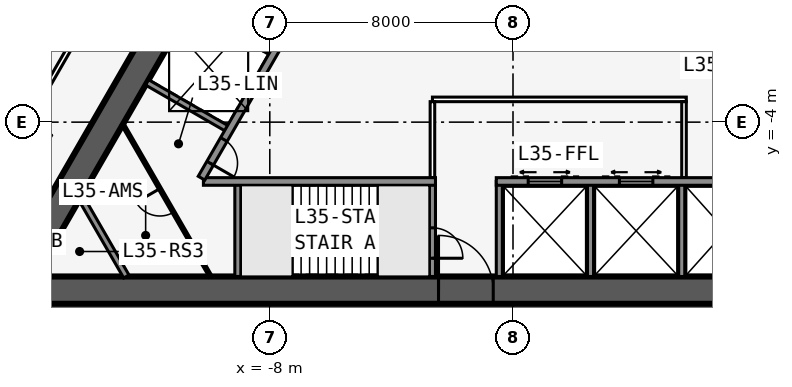
"""IFC4 building model, lengths in metres.
Left out: names, types, materials, properties, quantities, classifications, styles, units other than length and angle.
Written with IfcOpenShell. Run it as: python <this file> out.ifc"""

import sys

from ifc_helpers import new_model, si_unit, direction, frame, frame_2d, origin, place, context, subcontext, project, spatial, rectangle, extrude, element, fill, save


model = new_model("IFC4")
c1 = context("Model", 3, precision=1e-05, world=origin(), true_north=direction((0.0, 1.0)))
c2 = subcontext(c1, "Body", "Model", "MODEL_VIEW")
j1 = project(units=[si_unit("LENGTHUNIT", "METRE"), si_unit("PLANEANGLEUNIT", "RADIAN")], contexts=[c1])
p1 = place(None, origin())
s1 = spatial("IfcSite", under=j1, at=p1, CompositionType="ELEMENT")
p2 = place(p1, origin())
s2 = spatial("IfcBuilding", under=s1, at=p2, CompositionType="ELEMENT")
p3 = place(p2, frame((0.0, 0.0, 135.1)))
s3 = spatial("IfcBuildingStorey", under=s2, at=p3, CompositionType="ELEMENT", Elevation=135.1)
p4 = place(p3, frame((-16.5, -9.526, 0.0), z_axis=(0.0, 0.0, 1.0), x_axis=(1.0, 0.0, 0.0)))
e1 = element("IfcWall", 1, at=p4, inside=s3, PredefinedType="SHEAR", context=c2, shape_type="SweptSolid", body=[
    extrude(rectangle(XDim=33.0, YDim=0.9, at=frame_2d((16.5, 0.0))), origin(), (0.0, 0.0, 1.0), 3.4),
])
p5 = place(p4, frame((14.05, 0.0, 0.0)))
e2 = element("IfcOpeningElement", 2, at=p5, cuts=e1, PredefinedType="OPENING", context=c2, shape_type="SweptSolid", body=[
    extrude(rectangle(XDim=1.8, YDim=2.13, at=frame_2d((0.9, 1.065))), frame((0.0, 0.46, 0.0), z_axis=(0.0, -1.0, 0.0), x_axis=(1.0, 0.0, 0.0)), (0.0, 0.0, 1.0), 0.92),
])
p6 = place(p3, frame((-10.183, -5.951, 0.0), z_axis=(0.0, 0.0, 1.0), x_axis=(1.0, 0.0, 0.0)))
e3 = element("IfcWall", 3, at=p6, inside=s3, PredefinedType="SOLIDWALL", context=c2, shape_type="SweptSolid", body=[
    extrude(rectangle(XDim=7.633, YDim=0.25, at=frame_2d((3.816, 0.0))), origin(), (0.0, 0.0, 1.0), 3.235),
])
p7 = place(p3, frame((-0.55, -5.951, 0.0), z_axis=(0.0, 0.0, 1.0), x_axis=(1.0, 0.0, 0.0)))
e4 = element("IfcWall", 4, at=p7, inside=s3, PredefinedType="SOLIDWALL", context=c2, shape_type="SweptSolid", body=[
    extrude(rectangle(XDim=10.733, YDim=0.25, at=frame_2d((5.366, 0.0))), origin(), (0.0, 0.0, 1.0), 3.235),
])
p8 = place(p7, frame((9.314, 0.0, 0.0)))
e5 = element("IfcOpeningElement", 5, at=p8, cuts=e4, PredefinedType="OPENING", context=c2, shape_type="SweptSolid", body=[
    extrude(rectangle(XDim=0.9, YDim=2.13, at=frame_2d((0.45, 1.065))), frame((0.0, 0.135, 0.0), z_axis=(0.0, -1.0, 0.0), x_axis=(1.0, 0.0, 0.0)), (0.0, 0.0, 1.0), 0.27),
])
p9 = place(p7, frame((1.05, 0.0, 0.0)))
e6 = element("IfcOpeningElement", 6, at=p9, cuts=e4, PredefinedType="OPENING", context=c2, shape_type="SweptSolid", body=[
    extrude(rectangle(XDim=1.1, YDim=2.13, at=frame_2d((0.55, 1.065))), frame((0.0, 0.135, 0.0), z_axis=(0.0, -1.0, 0.0), x_axis=(1.0, 0.0, 0.0)), (0.0, 0.0, 1.0), 0.27),
])
p10 = place(p7, frame((4.05, 0.0, 0.0)))
e7 = element("IfcOpeningElement", 7, at=p10, cuts=e4, PredefinedType="OPENING", context=c2, shape_type="SweptSolid", body=[
    extrude(rectangle(XDim=1.1, YDim=2.13, at=frame_2d((0.55, 1.065))), frame((0.0, 0.135, 0.0), z_axis=(0.0, -1.0, 0.0), x_axis=(1.0, 0.0, 0.0)), (0.0, 0.0, 1.0), 0.27),
])
p11 = place(p3, frame((-9.05, -5.951, 0.0), z_axis=(0.0, 0.0, 1.0), x_axis=(0.0, -1.0, 0.0)))
e8 = element("IfcWall", 8, at=p11, inside=s3, PredefinedType="SOLIDWALL", context=c2, shape_type="SweptSolid", body=[
    extrude(rectangle(XDim=3.125, YDim=0.2, at=frame_2d((1.562, 0.0))), origin(), (0.0, 0.0, 1.0), 3.235),
])
p12 = place(p3, frame((-2.65, -5.951, 0.0), z_axis=(0.0, 0.0, 1.0), x_axis=(0.0, -1.0, 0.0)))
e9 = element("IfcWall", 9, at=p12, inside=s3, PredefinedType="SOLIDWALL", context=c2, shape_type="SweptSolid", body=[
    extrude(rectangle(XDim=3.125, YDim=0.2, at=frame_2d((1.562, 0.0))), origin(), (0.0, 0.0, 1.0), 3.235),
])
p13 = place(p12, frame((1.525, 0.0, 0.0)))
e10 = element("IfcOpeningElement", 10, at=p13, cuts=e9, PredefinedType="OPENING", context=c2, shape_type="SweptSolid", body=[
    extrude(rectangle(XDim=1.0, YDim=2.13, at=frame_2d((0.5, 1.065))), frame((0.0, 0.11, 0.0), z_axis=(0.0, -1.0, 0.0), x_axis=(1.0, 0.0, 0.0)), (0.0, 0.0, 1.0), 0.22),
])
for number, where, z_axis, x_axis in (
    (11, (-0.45, -5.951, 0.0), (0.0, 0.0, 1.0), (0.0, -1.0, 0.0)),
    (12, (2.55, -5.951, 0.0), (0.0, 0.0, 1.0), (0.0, -1.0, 0.0)),
    (13, (5.55, -5.951, 0.0), (0.0, 0.0, 1.0), (0.0, -1.0, 0.0)),
):
    element("IfcWall", number, at=place(p3, frame(where, z_axis=z_axis, x_axis=x_axis)), inside=s3, PredefinedType="SOLIDWALL", context=c2, shape_type="SweptSolid", body=[
        extrude(rectangle(XDim=3.125, YDim=0.2, at=frame_2d((1.562, 0.0))), origin(), (0.0, 0.0, 1.0), 3.235),
    ])
p14 = place(p3, frame((16.5, -9.526, 0.0), z_axis=(0.0, 0.0, 1.0), x_axis=(-0.499999749417, 0.866025548458, 0.0)))
e14 = element("IfcWall", 14, at=p14, inside=s3, PredefinedType="SHEAR", context=c2, shape_type="SweptSolid", body=[
    extrude(rectangle(XDim=33.0, YDim=0.9, at=frame_2d((16.5, 0.0))), origin(), (0.0, 0.0, 1.0), 3.4),
])
p15 = place(p14, frame((14.15, 0.0, 0.0)))
e15 = element("IfcOpeningElement", 15, at=p15, cuts=e14, PredefinedType="OPENING", context=c2, shape_type="SweptSolid", body=[
    extrude(rectangle(XDim=1.8, YDim=2.13, at=frame_2d((0.9, 1.065))), frame((0.0, 0.46, 0.0), z_axis=(0.0, -1.0, 0.0), x_axis=(1.0, 0.0, 0.0)), (0.0, 0.0, 1.0), 0.92),
])
p16 = place(p14, frame((12.6, 0.0, 0.0)))
e16 = element("IfcOpeningElement", 16, at=p16, cuts=e14, PredefinedType="OPENING", context=c2, shape_type="SweptSolid", body=[
    extrude(rectangle(XDim=1.0, YDim=2.13, at=frame_2d((0.5, 1.065))), frame((0.0, 0.46, 0.0), z_axis=(0.0, -1.0, 0.0), x_axis=(1.0, 0.0, 0.0)), (0.0, 0.0, 1.0), 0.92),
])
p17 = place(p3, frame((10.245, -5.843, 0.0), z_axis=(0.0, 0.0, 1.0), x_axis=(-0.499993009313, 0.866029439822, 0.0)))
e17 = element("IfcWall", 17, at=p17, inside=s3, PredefinedType="SOLIDWALL", context=c2, shape_type="SweptSolid", body=[
    extrude(rectangle(XDim=7.733, YDim=0.25, at=frame_2d((3.866, 0.0))), origin(), (0.0, 0.0, 1.0), 3.235),
])
p18 = place(p3, frame((0.0, 19.052, 0.0), z_axis=(0.0, 0.0, 1.0), x_axis=(-0.499999749417, -0.866025548458, 0.0)))
e18 = element("IfcWall", 18, at=p18, inside=s3, PredefinedType="SHEAR", context=c2, shape_type="SweptSolid", body=[
    extrude(rectangle(XDim=33.0, YDim=0.9, at=frame_2d((16.5, 0.0))), origin(), (0.0, 0.0, 1.0), 3.4),
])
p19 = place(p18, frame((14.15, 0.0, 0.0)))
e19 = element("IfcOpeningElement", 19, at=p19, cuts=e18, PredefinedType="OPENING", context=c2, shape_type="SweptSolid", body=[
    extrude(rectangle(XDim=1.8, YDim=2.13, at=frame_2d((0.9, 1.065))), frame((0.0, 0.46, 0.0), z_axis=(0.0, -1.0, 0.0), x_axis=(1.0, 0.0, 0.0)), (0.0, 0.0, 1.0), 0.92),
])
p20 = place(p18, frame((12.6, 0.0, 0.0)))
e20 = element("IfcOpeningElement", 20, at=p20, cuts=e18, PredefinedType="OPENING", context=c2, shape_type="SweptSolid", body=[
    extrude(rectangle(XDim=1.0, YDim=2.13, at=frame_2d((0.5, 1.065))), frame((0.0, 0.46, 0.0), z_axis=(0.0, -1.0, 0.0), x_axis=(1.0, 0.0, 0.0)), (0.0, 0.0, 1.0), 0.92),
])
p21 = place(p3, frame((-4.929, 3.365, 0.0), z_axis=(0.0, 0.0, 1.0), x_axis=(-0.499991433582, -0.866030349552, 0.0)))
e21 = element("IfcWall", 21, at=p21, inside=s3, PredefinedType="SOLIDWALL", context=c2, shape_type="SweptSolid", body=[
    extrude(rectangle(XDim=10.633, YDim=0.25, at=frame_2d((5.316, 0.0))), origin(), (0.0, 0.0, 1.0), 3.235),
])
p22 = place(p21, frame((9.164, 0.0, 0.0)))
e22 = element("IfcOpeningElement", 22, at=p22, cuts=e21, PredefinedType="OPENING", context=c2, shape_type="SweptSolid", body=[
    extrude(rectangle(XDim=0.9, YDim=2.13, at=frame_2d((0.45, 1.065))), frame((0.0, 0.135, 0.0), z_axis=(0.0, -1.0, 0.0), x_axis=(1.0, 0.0, 0.0)), (0.0, 0.0, 1.0), 0.27),
])
for number, where, z_axis, x_axis in (
    (23, (-7.879, -1.744, 0.0), (0.0, 0.0, 1.0), (-0.866, 0.5, 0.0)),
    (24, (-9.329, -4.256, 0.0), (0.0, 0.0, 1.0), (-0.866, 0.5, 0.0)),
):
    element("IfcWall", number, at=place(p3, frame(where, z_axis=z_axis, x_axis=x_axis)), inside=s3, PredefinedType="SOLIDWALL", context=c2, shape_type="SweptSolid", body=[
        extrude(rectangle(XDim=3.125, YDim=0.2, at=frame_2d((1.562, 0.0))), origin(), (0.0, 0.0, 1.0), 3.235),
    ])
p23 = place(p3, frame((20.027, -10.985, 0.0), z_axis=(0.0, 0.0, 1.0), x_axis=(-0.500001677587, 0.866024435227, 0.0)))
e25 = element("IfcWall", 25, at=p23, inside=s3, PredefinedType="PARTITIONING", context=c2, shape_type="SweptSolid", body=[
    extrude(rectangle(XDim=39.054, YDim=0.15, at=frame_2d((19.527, 0.0))), origin(), (0.0, 0.0, 1.0), 3.235),
])
p24 = place(p23, frame((1.558, 0.0, 0.0)))
e26 = element("IfcOpeningElement", 26, at=p24, cuts=e25, PredefinedType="OPENING", context=c2, shape_type="SweptSolid", body=[
    extrude(rectangle(XDim=0.95, YDim=2.13, at=frame_2d((0.475, 1.065))), frame((0.0, 0.085, 0.0), z_axis=(0.0, -1.0, 0.0), x_axis=(1.0, 0.0, 0.0)), (0.0, 0.0, 1.0), 0.17),
])
p25 = place(p23, frame((10.352, 0.0, 0.0)))
e27 = element("IfcOpeningElement", 27, at=p25, cuts=e25, PredefinedType="OPENING", context=c2, shape_type="SweptSolid", body=[
    extrude(rectangle(XDim=0.95, YDim=2.13, at=frame_2d((0.475, 1.065))), frame((0.0, 0.085, 0.0), z_axis=(0.0, -1.0, 0.0), x_axis=(1.0, 0.0, 0.0)), (0.0, 0.0, 1.0), 0.17),
])
p26 = place(p23, frame((17.152, 0.0, 0.0)))
e28 = element("IfcOpeningElement", 28, at=p26, cuts=e25, PredefinedType="OPENING", context=c2, shape_type="SweptSolid", body=[
    extrude(rectangle(XDim=0.95, YDim=2.13, at=frame_2d((0.475, 1.065))), frame((0.0, 0.085, 0.0), z_axis=(0.0, -1.0, 0.0), x_axis=(1.0, 0.0, 0.0)), (0.0, 0.0, 1.0), 0.17),
])
p27 = place(p23, frame((20.952, 0.0, 0.0)))
e29 = element("IfcOpeningElement", 29, at=p27, cuts=e25, PredefinedType="OPENING", context=c2, shape_type="SweptSolid", body=[
    extrude(rectangle(XDim=0.95, YDim=2.13, at=frame_2d((0.475, 1.065))), frame((0.0, 0.085, 0.0), z_axis=(0.0, -1.0, 0.0), x_axis=(1.0, 0.0, 0.0)), (0.0, 0.0, 1.0), 0.17),
])
p28 = place(p23, frame((27.152, 0.0, 0.0)))
e30 = element("IfcOpeningElement", 30, at=p28, cuts=e25, PredefinedType="OPENING", context=c2, shape_type="SweptSolid", body=[
    extrude(rectangle(XDim=0.95, YDim=2.13, at=frame_2d((0.475, 1.065))), frame((0.0, 0.085, 0.0), z_axis=(0.0, -1.0, 0.0), x_axis=(1.0, 0.0, 0.0)), (0.0, 0.0, 1.0), 0.17),
])
p29 = place(p23, frame((36.546, 0.0, 0.0)))
e31 = element("IfcOpeningElement", 31, at=p29, cuts=e25, PredefinedType="OPENING", context=c2, shape_type="SweptSolid", body=[
    extrude(rectangle(XDim=0.95, YDim=2.13, at=frame_2d((0.475, 1.065))), frame((0.0, 0.085, 0.0), z_axis=(0.0, -1.0, 0.0), x_axis=(1.0, 0.0, 0.0)), (0.0, 0.0, 1.0), 0.17),
])
p30 = place(p3, frame((-0.5, 22.836, 0.0), z_axis=(0.0, 0.0, 1.0), x_axis=(-0.500001677587, -0.866024435227, 0.0)))
e32 = element("IfcWall", 32, at=p30, inside=s3, PredefinedType="PARTITIONING", context=c2, shape_type="SweptSolid", body=[
    extrude(rectangle(XDim=39.054, YDim=0.15, at=frame_2d((19.527, 0.0))), origin(), (0.0, 0.0, 1.0), 3.235),
])
p31 = place(p30, frame((1.558, 0.0, 0.0)))
e33 = element("IfcOpeningElement", 33, at=p31, cuts=e32, PredefinedType="OPENING", context=c2, shape_type="SweptSolid", body=[
    extrude(rectangle(XDim=0.95, YDim=2.13, at=frame_2d((0.475, 1.065))), frame((0.0, 0.085, 0.0), z_axis=(0.0, -1.0, 0.0), x_axis=(1.0, 0.0, 0.0)), (0.0, 0.0, 1.0), 0.17),
])
p32 = place(p30, frame((10.952, 0.0, 0.0)))
e34 = element("IfcOpeningElement", 34, at=p32, cuts=e32, PredefinedType="OPENING", context=c2, shape_type="SweptSolid", body=[
    extrude(rectangle(XDim=0.95, YDim=2.13, at=frame_2d((0.475, 1.065))), frame((0.0, 0.085, 0.0), z_axis=(0.0, -1.0, 0.0), x_axis=(1.0, 0.0, 0.0)), (0.0, 0.0, 1.0), 0.17),
])
p33 = place(p30, frame((17.752, 0.0, 0.0)))
e35 = element("IfcOpeningElement", 35, at=p33, cuts=e32, PredefinedType="OPENING", context=c2, shape_type="SweptSolid", body=[
    extrude(rectangle(XDim=0.95, YDim=2.13, at=frame_2d((0.475, 1.065))), frame((0.0, 0.085, 0.0), z_axis=(0.0, -1.0, 0.0), x_axis=(1.0, 0.0, 0.0)), (0.0, 0.0, 1.0), 0.17),
])
p34 = place(p30, frame((21.552, 0.0, 0.0)))
e36 = element("IfcOpeningElement", 36, at=p34, cuts=e32, PredefinedType="OPENING", context=c2, shape_type="SweptSolid", body=[
    extrude(rectangle(XDim=0.95, YDim=2.13, at=frame_2d((0.475, 1.065))), frame((0.0, 0.085, 0.0), z_axis=(0.0, -1.0, 0.0), x_axis=(1.0, 0.0, 0.0)), (0.0, 0.0, 1.0), 0.17),
])
p35 = place(p30, frame((30.952, 0.0, 0.0)))
e37 = element("IfcOpeningElement", 37, at=p35, cuts=e32, PredefinedType="OPENING", context=c2, shape_type="SweptSolid", body=[
    extrude(rectangle(XDim=0.95, YDim=2.13, at=frame_2d((0.475, 1.065))), frame((0.0, 0.085, 0.0), z_axis=(0.0, -1.0, 0.0), x_axis=(1.0, 0.0, 0.0)), (0.0, 0.0, 1.0), 0.17),
])
p36 = place(p30, frame((37.752, 0.0, 0.0)))
e38 = element("IfcOpeningElement", 38, at=p36, cuts=e32, PredefinedType="OPENING", context=c2, shape_type="SweptSolid", body=[
    extrude(rectangle(XDim=0.95, YDim=2.13, at=frame_2d((0.475, 1.065))), frame((0.0, 0.085, 0.0), z_axis=(0.0, -1.0, 0.0), x_axis=(1.0, 0.0, 0.0)), (0.0, 0.0, 1.0), 0.17),
])
p37 = place(p3, frame((-2.65, -3.251, 0.0), z_axis=(0.0, 0.0, 1.0), x_axis=(1.0, 0.0, 0.0)))
e39 = element("IfcWall", 39, at=p37, inside=s3, PredefinedType="PARTITIONING", context=c2, shape_type="SweptSolid", body=[
    extrude(rectangle(XDim=8.35, YDim=0.15, at=frame_2d((4.175, 0.0))), origin(), (0.0, 0.0, 1.0), 3.235),
])
for number, where, z_axis, x_axis in (
    (40, (-2.65, -5.826, 0.0), (0.0, 0.0, 1.0), (0.0, 1.0, 0.0)),
    (41, (5.625, -5.826, 0.0), (0.0, 0.0, 1.0), (0.0, 1.0, 0.0)),
):
    element("IfcWall", number, at=place(p3, frame(where, z_axis=z_axis, x_axis=x_axis)), inside=s3, PredefinedType="PARTITIONING", context=c2, shape_type="SweptSolid", body=[
        extrude(rectangle(XDim=2.5, YDim=0.15, at=frame_2d((1.25, 0.0))), origin(), (0.0, 0.0, 1.0), 3.235),
    ])
p38 = place(p3, frame((-12.719, -9.076, 0.0), z_axis=(0.0, 0.0, 1.0), x_axis=(-0.499952404951, 0.866052881055, 0.0)))
e42 = element("IfcWall", 42, at=p38, inside=s3, PredefinedType="SOLIDWALL", context=c2, shape_type="SweptSolid", body=[
    extrude(rectangle(XDim=3.002, YDim=0.2, at=frame_2d((1.501, 0.0))), origin(), (0.0, 0.0, 1.0), 3.235),
])
p39 = place(p3, frame((-9.947, -9.076, 0.0), z_axis=(0.0, 0.0, 1.0), x_axis=(-0.500027479704, 0.866009537788, 0.0)))
e43 = element("IfcWall", 43, at=p39, inside=s3, PredefinedType="PARTITIONING", context=c2, shape_type="SweptSolid", body=[
    extrude(rectangle(XDim=5.774, YDim=0.1, at=frame_2d((2.887, 0.0))), origin(), (0.0, 0.0, 1.0), 3.235),
])
p40 = place(p39, frame((2.437, 0.0, 0.0)))
e44 = element("IfcOpeningElement", 44, at=p40, cuts=e43, PredefinedType="OPENING", context=c2, shape_type="SweptSolid", body=[
    extrude(rectangle(XDim=0.9, YDim=2.13, at=frame_2d((0.45, 1.065))), frame((0.0, 0.06, 0.0), z_axis=(0.0, -1.0, 0.0), x_axis=(1.0, 0.0, 0.0)), (0.0, 0.0, 1.0), 0.12),
])
p41 = place(p3, frame((-7.247, -7.576, 0.0), z_axis=(0.0, 0.0, 1.0), x_axis=(1.0, 0.0, 0.0)))
e45 = element("IfcWall", 45, at=p41, inside=s3, PredefinedType="SOLIDWALL", context=c2, shape_type="SweptSolid", body=[
    extrude(rectangle(XDim=2.794, YDim=0.1, at=frame_2d((1.397, 0.0))), origin(), (0.0, 0.0, 1.0), 3.4),
])
p42 = place(p5, origin())
e46 = element("IfcDoor", 46, at=p42, inside=s3, OperationType="DOUBLE_DOOR_SINGLE_SWING", PredefinedType="DOOR", context=c2, shape_type="SweptSolid", body=[
    extrude(rectangle(XDim=1.8, YDim=2.13, at=frame_2d((0.9, 1.065))), frame((0.0, 0.025, 0.0), z_axis=(0.0, -1.0, 0.0), x_axis=(1.0, 0.0, 0.0)), (0.0, 0.0, 1.0), 0.05),
])
fill(e2, e46)
p43 = place(p13, origin())
e47 = element("IfcDoor", 47, at=p43, inside=s3, OperationType="SINGLE_SWING_RIGHT", PredefinedType="DOOR", context=c2, shape_type="SweptSolid", body=[
    extrude(rectangle(XDim=1.0, YDim=2.13, at=frame_2d((0.5, 1.065))), frame((0.0, 0.025, 0.0), z_axis=(0.0, -1.0, 0.0), x_axis=(1.0, 0.0, 0.0)), (0.0, 0.0, 1.0), 0.05),
])
fill(e10, e47)
p44 = place(p40, origin())
e48 = element("IfcDoor", 48, at=p44, inside=s3, OperationType="SINGLE_SWING_RIGHT", PredefinedType="DOOR", context=c2, shape_type="SweptSolid", body=[
    extrude(rectangle(XDim=0.9, YDim=2.13, at=frame_2d((0.45, 1.065))), frame((0.0, 0.025, 0.0), z_axis=(0.0, -1.0, 0.0), x_axis=(1.0, 0.0, 0.0)), (0.0, 0.0, 1.0), 0.05),
])
fill(e44, e48)
p45 = place(p22, origin())
e49 = element("IfcDoor", 49, at=p45, inside=s3, OperationType="SINGLE_SWING_RIGHT", PredefinedType="DOOR", context=c2, shape_type="SweptSolid", body=[
    extrude(rectangle(XDim=0.9, YDim=2.13, at=frame_2d((0.45, 1.065))), frame((0.0, 0.025, 0.0), z_axis=(0.0, -1.0, 0.0), x_axis=(1.0, 0.0, 0.0)), (0.0, 0.0, 1.0), 0.05),
])
fill(e22, e49)
p46 = place(p9, origin())
e50 = element("IfcDoor", 50, at=p46, inside=s3, OperationType="DOUBLE_DOOR_SLIDING", PredefinedType="USERDEFINED", context=c2, shape_type="SweptSolid", body=[
    extrude(rectangle(XDim=1.1, YDim=2.13, at=frame_2d((0.55, 1.065))), frame((0.0, 0.025, 0.0), z_axis=(0.0, -1.0, 0.0), x_axis=(1.0, 0.0, 0.0)), (0.0, 0.0, 1.0), 0.05),
])
fill(e6, e50)
p47 = place(p10, origin())
e51 = element("IfcDoor", 51, at=p47, inside=s3, OperationType="DOUBLE_DOOR_SLIDING", PredefinedType="USERDEFINED", context=c2, shape_type="SweptSolid", body=[
    extrude(rectangle(XDim=1.1, YDim=2.13, at=frame_2d((0.55, 1.065))), frame((0.0, 0.025, 0.0), z_axis=(0.0, -1.0, 0.0), x_axis=(1.0, 0.0, 0.0)), (0.0, 0.0, 1.0), 0.05),
])
fill(e7, e51)
save(model, sys.argv[1])
